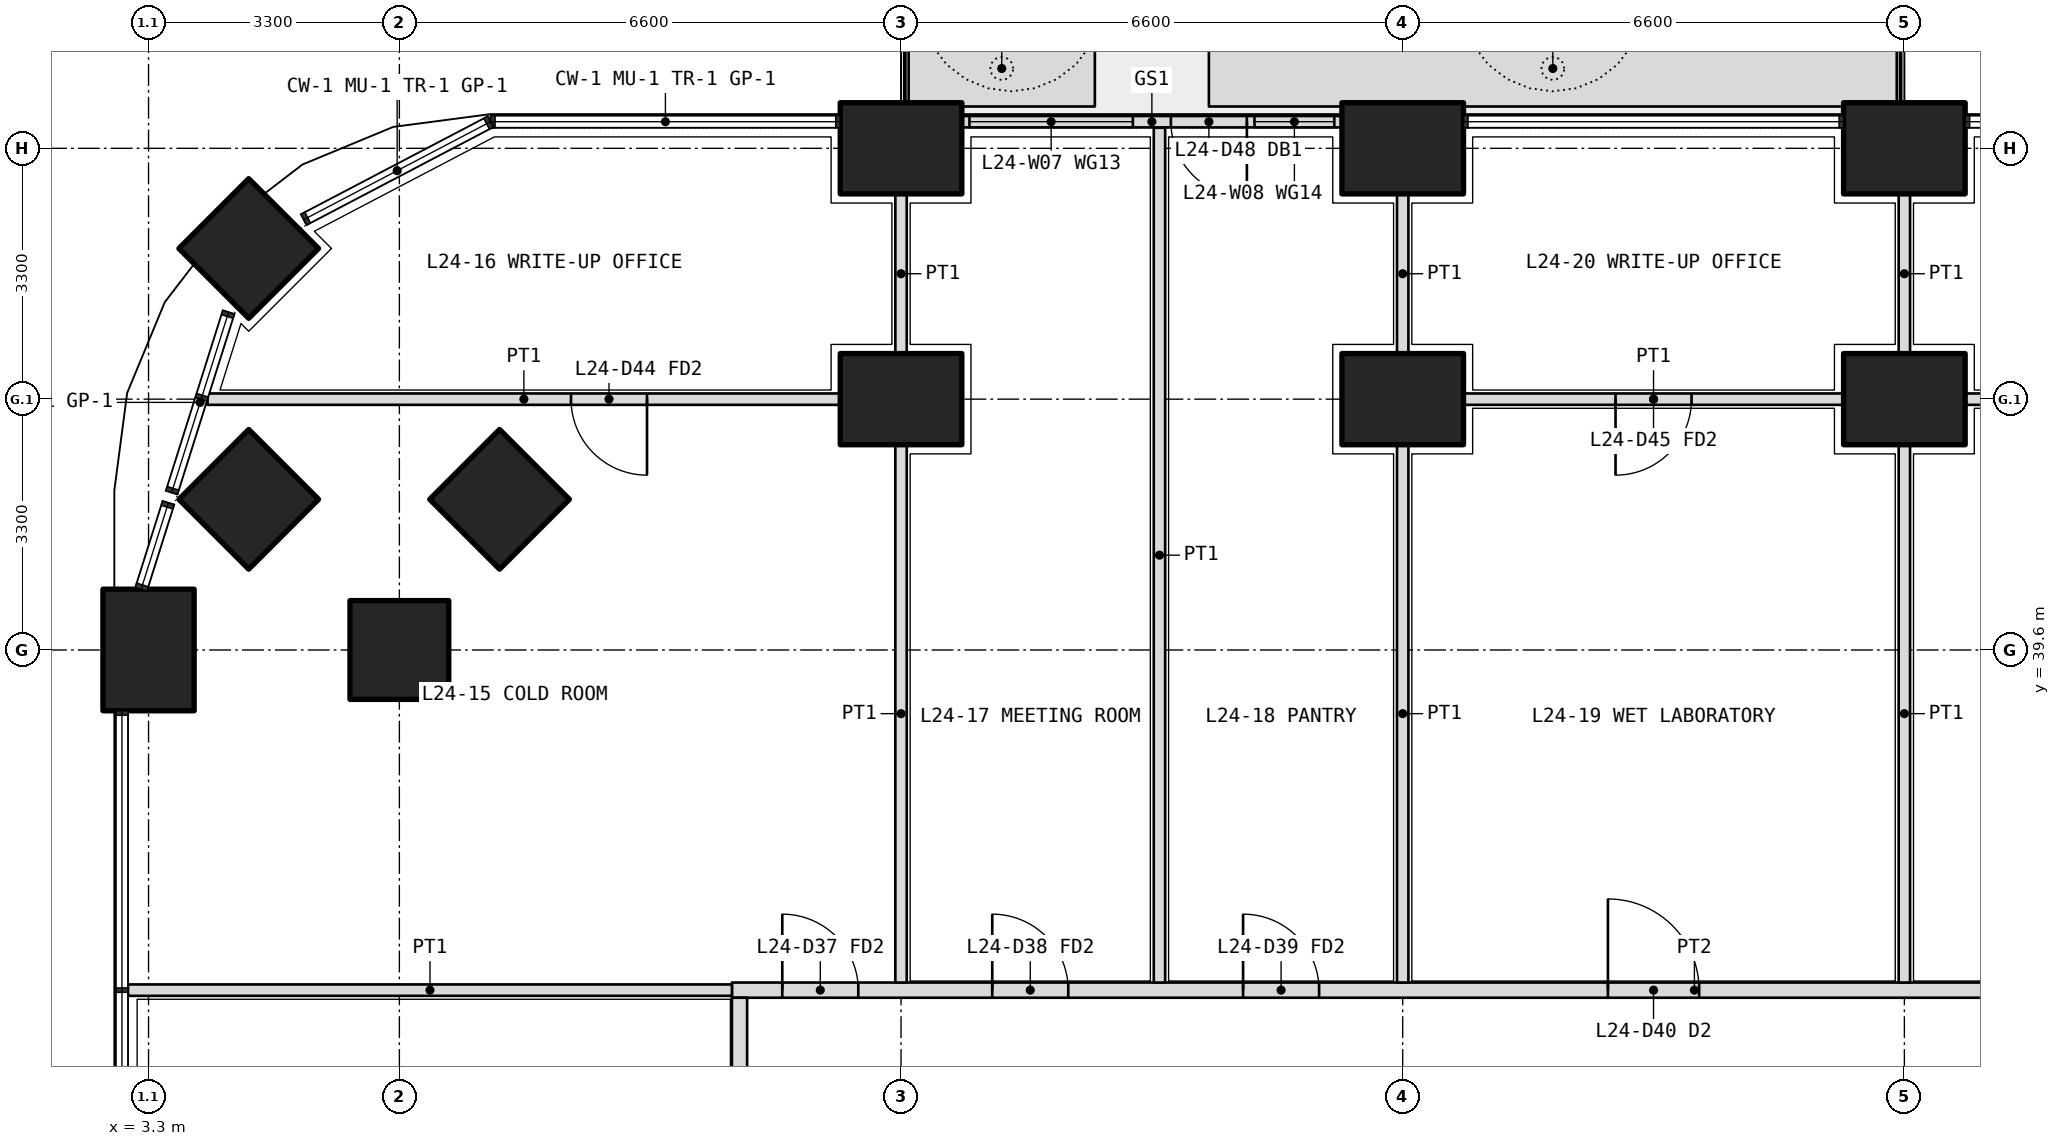
"""IFC4 building model, lengths in metres.
Left out: names, types, materials, properties, quantities, classifications, styles, units other than length and angle.
Written with IfcOpenShell. Run it as: python <this file> out.ifc"""

import sys

from ifc_helpers import new_model, si_unit, direction, frame, frame_2d, origin, origin_2d, place, context, subcontext, project, spatial, polyline, rectangle, outline, extrude, element, fill, save


model = new_model("IFC4")
c1 = context("Model", 3, precision=1e-05, world=origin(), true_north=direction((0.0, 1.0)))
c2 = subcontext(c1, "Body", "Model", "MODEL_VIEW")
j1 = project(units=[si_unit("LENGTHUNIT", "METRE"), si_unit("PLANEANGLEUNIT", "RADIAN")], contexts=[c1])
p1 = place(None, origin())
s1 = spatial("IfcSite", under=j1, at=p1, CompositionType="ELEMENT")
p2 = place(p1, origin())
s2 = spatial("IfcBuilding", under=s1, at=p2, CompositionType="ELEMENT")
p3 = place(p2, frame((0.0, 0.0, 107.4)))
s3 = spatial("IfcBuildingStorey", under=s2, at=p3, CompositionType="ELEMENT", Elevation=107.4)
p4 = place(p3, frame((4.618, 44.882, 0.0), z_axis=(0.0, 0.0, 1.0), x_axis=(0.707106781187, 0.707106781187, 0.0)))
e1 = element("IfcColumn", 1, at=p4, inside=s3, PredefinedType="COLUMN", context=c2, shape_type="SweptSolid", body=[
    extrude(rectangle(XDim=1.3, YDim=1.3, at=origin_2d()), origin(), (0.0, 0.0, 1.0), 4.2),
])
for number, where, z_axis, x_axis in (
    (2, (3.3, 39.6, 0.0), (0.0, 0.0, 1.0), (0.0, 1.0, 0.0)),
    (3, (13.2, 46.2, 0.0), (0.0, 0.0, 1.0), (1.0, 0.0, 0.0)),
    (4, (19.8, 46.2, 0.0), (0.0, 0.0, 1.0), (1.0, 0.0, 0.0)),
    (5, (26.4, 46.2, 0.0), (0.0, 0.0, 1.0), (1.0, 0.0, 0.0)),
):
    element("IfcColumn", number, at=place(p3, frame(where, z_axis=z_axis, x_axis=x_axis)), inside=s3, PredefinedType="COLUMN", context=c2, shape_type="SweptSolid", body=[
        extrude(rectangle(XDim=1.6, YDim=1.2, at=origin_2d()), origin(), (0.0, 0.0, 1.0), 4.2),
    ])
for number, where, z_axis, x_axis in (
    (6, (6.6, 39.6, 0.0), (0.0, 0.0, 1.0), (1.0, 0.0, 0.0)),
    (7, (4.618, 41.582, 0.0), (0.0, 0.0, 1.0), (0.707, 0.707, 0.0)),
):
    element("IfcColumn", number, at=place(p3, frame(where, z_axis=z_axis, x_axis=x_axis)), inside=s3, PredefinedType="COLUMN", context=c2, shape_type="SweptSolid", body=[
        extrude(rectangle(XDim=1.3, YDim=1.3, at=origin_2d()), origin(), (0.0, 0.0, 1.0), 4.2),
    ])
for number, where, z_axis, x_axis in (
    (8, (13.2, 42.9, 0.0), (0.0, 0.0, 1.0), (1.0, 0.0, 0.0)),
    (9, (19.8, 42.9, 0.0), (0.0, 0.0, 1.0), (1.0, 0.0, 0.0)),
    (10, (26.4, 42.9, 0.0), (0.0, 0.0, 1.0), (1.0, 0.0, 0.0)),
):
    element("IfcColumn", number, at=place(p3, frame(where, z_axis=z_axis, x_axis=x_axis)), inside=s3, PredefinedType="COLUMN", context=c2, shape_type="SweptSolid", body=[
        extrude(rectangle(XDim=1.6, YDim=1.2, at=origin_2d()), origin(), (0.0, 0.0, 1.0), 4.2),
    ])
p5 = place(p3, frame((7.918, 41.582, 0.0), z_axis=(0.0, 0.0, 1.0), x_axis=(0.707106781187, 0.707106781187, 0.0)))
e11 = element("IfcColumn", 11, at=p5, inside=s3, PredefinedType="COLUMN", context=c2, shape_type="SweptSolid", body=[
    extrude(rectangle(XDim=1.3, YDim=1.3, at=origin_2d()), origin(), (0.0, 0.0, 1.0), 4.2),
])
p6 = place(p3, origin())
e12 = element("IfcWall", 12, at=p6, inside=s3, PredefinedType="USERDEFINED", context=c2, shape_type="SweptSolid", body=[
    extrude(outline(polyline([(13.3, 46.75), (15.75, 46.75), (15.75, 47.75), (13.3, 47.75), (13.3, 46.75)]), holes=[polyline([(13.45, 46.9), (15.6, 46.9), (15.6, 47.6), (13.45, 47.6), (13.45, 46.9)])]), origin(), (0.0, 0.0, 1.0), 1.05),
])
p7 = place(p3, origin())
e13 = element("IfcWall", 13, at=p7, inside=s3, PredefinedType="USERDEFINED", context=c2, shape_type="SweptSolid", body=[
    extrude(outline(polyline([(17.25, 46.75), (26.3, 46.75), (26.3, 47.75), (17.25, 47.75), (17.25, 46.75)]), holes=[polyline([(17.4, 46.9), (26.15, 46.9), (26.15, 47.6), (17.4, 47.6), (17.4, 46.9)])]), origin(), (0.0, 0.0, 1.0), 1.05),
])
p8 = place(p3, frame((19.0, 46.55, 0.0), z_axis=(0.0, 0.0, 1.0), x_axis=(-1.0, 0.0, 0.0)))
e14 = element("IfcWall", 14, at=p8, inside=s3, PredefinedType="SOLIDWALL", context=c2, shape_type="SweptSolid", body=[
    extrude(rectangle(XDim=5.0, YDim=0.15, at=frame_2d((2.5, 0.0))), origin(), (0.0, 0.0, 1.0), 2.7),
])
p9 = place(p8, frame((1.25, 0.0, 0.0)))
e15 = element("IfcOpeningElement", 15, at=p9, cuts=e14, PredefinedType="OPENING", context=c2, shape_type="SweptSolid", body=[
    extrude(rectangle(XDim=1.0, YDim=2.4, at=frame_2d((0.5, 1.2))), frame((0.0, 0.085, 0.0), z_axis=(0.0, -1.0, 0.0), x_axis=(1.0, 0.0, 0.0)), (0.0, 0.0, 1.0), 0.17),
])
p10 = place(p8, frame((0.1, 0.0, 0.1)))
e16 = element("IfcOpeningElement", 16, at=p10, cuts=e14, PredefinedType="OPENING", context=c2, shape_type="SweptSolid", body=[
    extrude(rectangle(XDim=1.05, YDim=2.3, at=frame_2d((0.525, 1.15))), frame((0.0, 0.085, 0.0), z_axis=(0.0, -1.0, 0.0), x_axis=(1.0, 0.0, 0.0)), (0.0, 0.0, 1.0), 0.17),
])
p11 = place(p8, frame((2.75, 0.0, 0.1)))
e17 = element("IfcOpeningElement", 17, at=p11, cuts=e14, PredefinedType="OPENING", context=c2, shape_type="SweptSolid", body=[
    extrude(rectangle(XDim=2.15, YDim=2.3, at=frame_2d((1.075, 1.15))), frame((0.0, 0.085, 0.0), z_axis=(0.0, -1.0, 0.0), x_axis=(1.0, 0.0, 0.0)), (0.0, 0.0, 1.0), 0.17),
])
p12 = place(p3, frame((10.975, 35.125, 0.0), z_axis=(0.0, 0.0, 1.0), x_axis=(1.0, 0.0, 0.0)))
e18 = element("IfcWall", 18, at=p12, inside=s3, PredefinedType="PARTITIONING", context=c2, shape_type="SweptSolid", body=[
    extrude(rectangle(XDim=25.325, YDim=0.2, at=frame_2d((12.663, 0.0))), origin(), (0.0, 0.0, 1.0), 2.85),
])
p13 = place(p12, frame((0.663, 0.0, 0.0)))
e19 = element("IfcOpeningElement", 19, at=p13, cuts=e18, PredefinedType="OPENING", context=c2, shape_type="SweptSolid", body=[
    extrude(rectangle(XDim=1.0, YDim=2.1, at=frame_2d((0.5, 1.05))), frame((0.0, 0.11, 0.0), z_axis=(0.0, -1.0, 0.0), x_axis=(1.0, 0.0, 0.0)), (0.0, 0.0, 1.0), 0.22),
])
p14 = place(p12, frame((3.425, 0.0, 0.0)))
e20 = element("IfcOpeningElement", 20, at=p14, cuts=e18, PredefinedType="OPENING", context=c2, shape_type="SweptSolid", body=[
    extrude(rectangle(XDim=1.0, YDim=2.1, at=frame_2d((0.5, 1.05))), frame((0.0, 0.11, 0.0), z_axis=(0.0, -1.0, 0.0), x_axis=(1.0, 0.0, 0.0)), (0.0, 0.0, 1.0), 0.22),
])
p15 = place(p12, frame((6.725, 0.0, 0.0)))
e21 = element("IfcOpeningElement", 21, at=p15, cuts=e18, PredefinedType="OPENING", context=c2, shape_type="SweptSolid", body=[
    extrude(rectangle(XDim=1.0, YDim=2.1, at=frame_2d((0.5, 1.05))), frame((0.0, 0.11, 0.0), z_axis=(0.0, -1.0, 0.0), x_axis=(1.0, 0.0, 0.0)), (0.0, 0.0, 1.0), 0.22),
])
p16 = place(p12, frame((11.525, 0.0, 0.0)))
e22 = element("IfcOpeningElement", 22, at=p16, cuts=e18, PredefinedType="OPENING", context=c2, shape_type="SweptSolid", body=[
    extrude(rectangle(XDim=1.2, YDim=2.1, at=frame_2d((0.6, 1.05))), frame((0.0, 0.11, 0.0), z_axis=(0.0, -1.0, 0.0), x_axis=(1.0, 0.0, 0.0)), (0.0, 0.0, 1.0), 0.22),
])
p17 = place(p12, frame((19.775, 0.0, 0.0)))
e23 = element("IfcOpeningElement", 23, at=p17, cuts=e18, PredefinedType="OPENING", context=c2, shape_type="SweptSolid", body=[
    extrude(rectangle(XDim=1.2, YDim=2.1, at=frame_2d((0.6, 1.05))), frame((0.0, 0.11, 0.0), z_axis=(0.0, -1.0, 0.0), x_axis=(1.0, 0.0, 0.0)), (0.0, 0.0, 1.0), 0.22),
])
p18 = place(p3, frame((11.075, 7.4, 0.0), z_axis=(0.0, 0.0, 1.0), x_axis=(0.0, 1.0, 0.0)))
e24 = element("IfcWall", 24, at=p18, inside=s3, PredefinedType="PARTITIONING", context=c2, shape_type="SweptSolid", body=[
    extrude(rectangle(XDim=27.625, YDim=0.2, at=frame_2d((13.812, 0.0))), origin(), (0.0, 0.0, 1.0), 2.85),
])
p19 = place(p18, frame((2.35, 0.0, 0.0)))
e25 = element("IfcOpeningElement", 25, at=p19, cuts=e24, PredefinedType="OPENING", context=c2, shape_type="SweptSolid", body=[
    extrude(rectangle(XDim=1.0, YDim=2.1, at=frame_2d((0.5, 1.05))), frame((0.0, 0.11, 0.0), z_axis=(0.0, -1.0, 0.0), x_axis=(1.0, 0.0, 0.0)), (0.0, 0.0, 1.0), 0.22),
])
p20 = place(p18, frame((6.35, 0.0, 0.0)))
e26 = element("IfcOpeningElement", 26, at=p20, cuts=e24, PredefinedType="OPENING", context=c2, shape_type="SweptSolid", body=[
    extrude(rectangle(XDim=1.0, YDim=2.1, at=frame_2d((0.5, 1.05))), frame((0.0, 0.11, 0.0), z_axis=(0.0, -1.0, 0.0), x_axis=(1.0, 0.0, 0.0)), (0.0, 0.0, 1.0), 0.22),
])
p21 = place(p18, frame((9.4, 0.0, 0.0)))
e27 = element("IfcOpeningElement", 27, at=p21, cuts=e24, PredefinedType="OPENING", context=c2, shape_type="SweptSolid", body=[
    extrude(rectangle(XDim=0.9, YDim=2.1, at=frame_2d((0.45, 1.05))), frame((0.0, 0.11, 0.0), z_axis=(0.0, -1.0, 0.0), x_axis=(1.0, 0.0, 0.0)), (0.0, 0.0, 1.0), 0.22),
])
p22 = place(p18, frame((13.2, 0.0, 0.0)))
e28 = element("IfcOpeningElement", 28, at=p22, cuts=e24, PredefinedType="OPENING", context=c2, shape_type="SweptSolid", body=[
    extrude(rectangle(XDim=0.9, YDim=2.1, at=frame_2d((0.45, 1.05))), frame((0.0, 0.11, 0.0), z_axis=(0.0, -1.0, 0.0), x_axis=(1.0, 0.0, 0.0)), (0.0, 0.0, 1.0), 0.22),
])
p23 = place(p18, frame((16.75, 0.0, 0.0)))
e29 = element("IfcOpeningElement", 29, at=p23, cuts=e24, PredefinedType="OPENING", context=c2, shape_type="SweptSolid", body=[
    extrude(rectangle(XDim=1.0, YDim=2.1, at=frame_2d((0.5, 1.05))), frame((0.0, 0.11, 0.0), z_axis=(0.0, -1.0, 0.0), x_axis=(1.0, 0.0, 0.0)), (0.0, 0.0, 1.0), 0.22),
])
p24 = place(p18, frame((20.15, 0.0, 0.0)))
e30 = element("IfcOpeningElement", 30, at=p24, cuts=e24, PredefinedType="OPENING", context=c2, shape_type="SweptSolid", body=[
    extrude(rectangle(XDim=1.0, YDim=2.1, at=frame_2d((0.5, 1.05))), frame((0.0, 0.11, 0.0), z_axis=(0.0, -1.0, 0.0), x_axis=(1.0, 0.0, 0.0)), (0.0, 0.0, 1.0), 0.22),
])
p25 = place(p18, frame((24.512, 0.0, 0.0)))
e31 = element("IfcOpeningElement", 31, at=p25, cuts=e24, PredefinedType="OPENING", context=c2, shape_type="SweptSolid", body=[
    extrude(rectangle(XDim=1.0, YDim=2.1, at=frame_2d((0.5, 1.05))), frame((0.0, 0.11, 0.0), z_axis=(0.0, -1.0, 0.0), x_axis=(1.0, 0.0, 0.0)), (0.0, 0.0, 1.0), 0.22),
])
p26 = place(p3, frame((3.03, 35.125, 0.0), z_axis=(0.0, 0.0, 1.0), x_axis=(1.0, 0.0, 0.0)))
e32 = element("IfcWall", 32, at=p26, inside=s3, PredefinedType="PARTITIONING", context=c2, shape_type="SweptSolid", body=[
    extrude(rectangle(XDim=7.945, YDim=0.15, at=frame_2d((3.973, 0.0))), origin(), (0.0, 0.0, 1.0), 2.7),
])
p27 = place(p3, frame((32.2, 42.9, 0.0), z_axis=(0.0, 0.0, 1.0), x_axis=(-1.0, 0.0, 0.0)))
e33 = element("IfcWall", 33, at=p27, inside=s3, PredefinedType="PARTITIONING", context=c2, shape_type="SweptSolid", body=[
    extrude(rectangle(XDim=5.0, YDim=0.15, at=frame_2d((2.5, 0.0))), origin(), (0.0, 0.0, 1.0), 3.9),
])
p28 = place(p27, frame((0.35, 0.0, 0.0)))
e34 = element("IfcOpeningElement", 34, at=p28, cuts=e33, PredefinedType="OPENING", context=c2, shape_type="SweptSolid", body=[
    extrude(rectangle(XDim=1.0, YDim=2.1, at=frame_2d((0.5, 1.05))), frame((0.0, 0.085, 0.0), z_axis=(0.0, -1.0, 0.0), x_axis=(1.0, 0.0, 0.0)), (0.0, 0.0, 1.0), 0.17),
])
p29 = place(p3, frame((25.6, 42.9, 0.0), z_axis=(0.0, 0.0, 1.0), x_axis=(-1.0, 0.0, 0.0)))
e35 = element("IfcWall", 35, at=p29, inside=s3, PredefinedType="PARTITIONING", context=c2, shape_type="SweptSolid", body=[
    extrude(rectangle(XDim=5.0, YDim=0.15, at=frame_2d((2.5, 0.0))), origin(), (0.0, 0.0, 1.0), 3.9),
])
p30 = place(p29, frame((2.0, 0.0, 0.0)))
e36 = element("IfcOpeningElement", 36, at=p30, cuts=e35, PredefinedType="OPENING", context=c2, shape_type="SweptSolid", body=[
    extrude(rectangle(XDim=1.0, YDim=2.1, at=frame_2d((0.5, 1.05))), frame((0.0, 0.085, 0.0), z_axis=(0.0, -1.0, 0.0), x_axis=(1.0, 0.0, 0.0)), (0.0, 0.0, 1.0), 0.17),
])
p31 = place(p3, frame((12.4, 42.9, 0.0), z_axis=(0.0, 0.0, 1.0), x_axis=(-1.0, 0.0, 0.0)))
e37 = element("IfcWall", 37, at=p31, inside=s3, PredefinedType="PARTITIONING", context=c2, shape_type="SweptSolid", body=[
    extrude(rectangle(XDim=8.324, YDim=0.15, at=frame_2d((4.162, 0.0))), origin(), (0.0, 0.0, 1.0), 2.7),
])
p32 = place(p31, frame((2.542, 0.0, 0.0)))
e38 = element("IfcOpeningElement", 38, at=p32, cuts=e37, PredefinedType="OPENING", context=c2, shape_type="SweptSolid", body=[
    extrude(rectangle(XDim=1.0, YDim=2.1, at=frame_2d((0.5, 1.05))), frame((0.0, 0.085, 0.0), z_axis=(0.0, -1.0, 0.0), x_axis=(1.0, 0.0, 0.0)), (0.0, 0.0, 1.0), 0.17),
])
p33 = place(p3, frame((16.6, 46.47, 0.0), z_axis=(0.0, 0.0, 1.0), x_axis=(0.0, -1.0, 0.0)))
e39 = element("IfcWall", 39, at=p33, inside=s3, PredefinedType="PARTITIONING", context=c2, shape_type="SweptSolid", body=[
    extrude(rectangle(XDim=11.245, YDim=0.15, at=frame_2d((5.623, 0.0))), origin(), (0.0, 0.0, 1.0), 2.7),
])
p34 = place(p3, frame((19.8, 45.6, 0.0), z_axis=(0.0, 0.0, 1.0), x_axis=(0.0, -1.0, 0.0)))
e40 = element("IfcWall", 40, at=p34, inside=s3, PredefinedType="PARTITIONING", context=c2, shape_type="SweptSolid", body=[
    extrude(rectangle(XDim=2.1, YDim=0.15, at=frame_2d((1.05, 0.0))), origin(), (0.0, 0.0, 1.0), 2.85),
])
p35 = place(p3, frame((19.8, 42.3, 0.0), z_axis=(0.0, 0.0, 1.0), x_axis=(0.0, -1.0, 0.0)))
e41 = element("IfcWall", 41, at=p35, inside=s3, PredefinedType="PARTITIONING", context=c2, shape_type="SweptSolid", body=[
    extrude(rectangle(XDim=7.075, YDim=0.15, at=frame_2d((3.538, 0.0))), origin(), (0.0, 0.0, 1.0), 2.85),
])
p36 = place(p3, frame((13.2, 45.6, 0.0), z_axis=(0.0, 0.0, 1.0), x_axis=(0.0, -1.0, 0.0)))
e42 = element("IfcWall", 42, at=p36, inside=s3, PredefinedType="PARTITIONING", context=c2, shape_type="SweptSolid", body=[
    extrude(rectangle(XDim=2.1, YDim=0.15, at=frame_2d((1.05, 0.0))), origin(), (0.0, 0.0, 1.0), 2.85),
])
p37 = place(p3, frame((13.2, 42.3, 0.0), z_axis=(0.0, 0.0, 1.0), x_axis=(0.0, -1.0, 0.0)))
e43 = element("IfcWall", 43, at=p37, inside=s3, PredefinedType="PARTITIONING", context=c2, shape_type="SweptSolid", body=[
    extrude(rectangle(XDim=7.075, YDim=0.15, at=frame_2d((3.538, 0.0))), origin(), (0.0, 0.0, 1.0), 2.85),
])
p38 = place(p3, frame((26.4, 45.6, 0.0), z_axis=(0.0, 0.0, 1.0), x_axis=(0.0, -1.0, 0.0)))
e44 = element("IfcWall", 44, at=p38, inside=s3, PredefinedType="PARTITIONING", context=c2, shape_type="SweptSolid", body=[
    extrude(rectangle(XDim=2.1, YDim=0.15, at=frame_2d((1.05, 0.0))), origin(), (0.0, 0.0, 1.0), 2.85),
])
p39 = place(p3, frame((26.4, 42.3, 0.0), z_axis=(0.0, 0.0, 1.0), x_axis=(0.0, -1.0, 0.0)))
e45 = element("IfcWall", 45, at=p39, inside=s3, PredefinedType="PARTITIONING", context=c2, shape_type="SweptSolid", body=[
    extrude(rectangle(XDim=7.075, YDim=0.15, at=frame_2d((3.538, 0.0))), origin(), (0.0, 0.0, 1.0), 2.85),
])
p40 = place(p9, origin())
e46 = element("IfcDoor", 46, at=p40, inside=s3, OperationType="SINGLE_SWING_LEFT", PredefinedType="DOOR", context=c2, shape_type="SweptSolid", body=[
    extrude(rectangle(XDim=1.0, YDim=2.4, at=frame_2d((0.5, 1.2))), frame((0.0, 0.025, 0.0), z_axis=(0.0, -1.0, 0.0), x_axis=(1.0, 0.0, 0.0)), (0.0, 0.0, 1.0), 0.05),
])
fill(e15, e46)
p41 = place(p10, origin())
e47 = element("IfcWindow", 47, at=p41, inside=s3, PartitioningType="SINGLE_PANEL", PredefinedType="WINDOW", context=c2, shape_type="SweptSolid", body=[
    extrude(rectangle(XDim=1.05, YDim=2.3, at=frame_2d((0.525, 1.15))), frame((0.0, 0.03, 0.0), z_axis=(0.0, -1.0, 0.0), x_axis=(1.0, 0.0, 0.0)), (0.0, 0.0, 1.0), 0.06),
])
fill(e16, e47)
p42 = place(p11, origin())
e48 = element("IfcWindow", 48, at=p42, inside=s3, PartitioningType="SINGLE_PANEL", PredefinedType="WINDOW", context=c2, shape_type="SweptSolid", body=[
    extrude(rectangle(XDim=2.15, YDim=2.3, at=frame_2d((1.075, 1.15))), frame((0.0, 0.03, 0.0), z_axis=(0.0, -1.0, 0.0), x_axis=(1.0, 0.0, 0.0)), (0.0, 0.0, 1.0), 0.06),
])
fill(e17, e48)
p43 = place(p13, origin())
e49 = element("IfcDoor", 49, at=p43, inside=s3, OperationType="SINGLE_SWING_LEFT", PredefinedType="DOOR", context=c2, shape_type="SweptSolid", body=[
    extrude(rectangle(XDim=1.0, YDim=2.1, at=frame_2d((0.5, 1.05))), frame((0.0, 0.025, 0.0), z_axis=(0.0, -1.0, 0.0), x_axis=(1.0, 0.0, 0.0)), (0.0, 0.0, 1.0), 0.05),
])
fill(e19, e49)
p44 = place(p32, origin())
e50 = element("IfcDoor", 50, at=p44, inside=s3, OperationType="SINGLE_SWING_LEFT", PredefinedType="DOOR", context=c2, shape_type="SweptSolid", body=[
    extrude(rectangle(XDim=1.0, YDim=2.1, at=frame_2d((0.5, 1.05))), frame((0.0, 0.025, 0.0), z_axis=(0.0, -1.0, 0.0), x_axis=(1.0, 0.0, 0.0)), (0.0, 0.0, 1.0), 0.05),
])
fill(e38, e50)
p45 = place(p14, origin())
e51 = element("IfcDoor", 51, at=p45, inside=s3, OperationType="SINGLE_SWING_LEFT", PredefinedType="DOOR", context=c2, shape_type="SweptSolid", body=[
    extrude(rectangle(XDim=1.0, YDim=2.1, at=frame_2d((0.5, 1.05))), frame((0.0, 0.025, 0.0), z_axis=(0.0, -1.0, 0.0), x_axis=(1.0, 0.0, 0.0)), (0.0, 0.0, 1.0), 0.05),
])
fill(e20, e51)
p46 = place(p15, origin())
e52 = element("IfcDoor", 52, at=p46, inside=s3, OperationType="SINGLE_SWING_LEFT", PredefinedType="DOOR", context=c2, shape_type="SweptSolid", body=[
    extrude(rectangle(XDim=1.0, YDim=2.1, at=frame_2d((0.5, 1.05))), frame((0.0, 0.025, 0.0), z_axis=(0.0, -1.0, 0.0), x_axis=(1.0, 0.0, 0.0)), (0.0, 0.0, 1.0), 0.05),
])
fill(e21, e52)
p47 = place(p16, origin())
e53 = element("IfcDoor", 53, at=p47, inside=s3, OperationType="DOUBLE_DOOR_SINGLE_SWING", PredefinedType="DOOR", context=c2, shape_type="SweptSolid", body=[
    extrude(rectangle(XDim=1.2, YDim=2.1, at=frame_2d((0.6, 1.05))), frame((0.0, 0.025, 0.0), z_axis=(0.0, -1.0, 0.0), x_axis=(1.0, 0.0, 0.0)), (0.0, 0.0, 1.0), 0.05),
])
fill(e22, e53)
p48 = place(p30, origin())
e54 = element("IfcDoor", 54, at=p48, inside=s3, OperationType="SINGLE_SWING_RIGHT", PredefinedType="DOOR", context=c2, shape_type="SweptSolid", body=[
    extrude(rectangle(XDim=1.0, YDim=2.1, at=frame_2d((0.5, 1.05))), frame((0.0, 0.025, 0.0), z_axis=(0.0, -1.0, 0.0), x_axis=(1.0, 0.0, 0.0)), (0.0, 0.0, 1.0), 0.05),
])
fill(e36, e54)
save(model, sys.argv[1])
